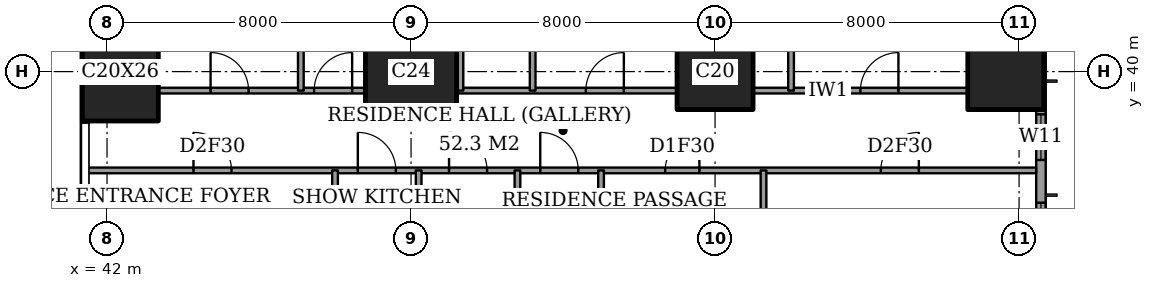
"""IFC4 building model, lengths in metres.
Left out: names, types, materials, properties, quantities, classifications, styles, units other than length and angle.
Written with IfcOpenShell. Run it as: python <this file> out.ifc"""

import sys

from ifc_helpers import new_model, si_unit, direction, frame, frame_2d, origin, origin_2d, place, context, subcontext, project, spatial, rectangle, extrude, element, fill, save


model = new_model("IFC4")
c1 = context("Model", 3, precision=1e-05, world=origin(), true_north=direction((0.0, 1.0)))
c2 = subcontext(c1, "Body", "Model", "MODEL_VIEW")
j1 = project(units=[si_unit("LENGTHUNIT", "METRE"), si_unit("PLANEANGLEUNIT", "RADIAN")], contexts=[c1])
p1 = place(None, origin())
s1 = spatial("IfcSite", under=j1, at=p1, CompositionType="ELEMENT")
p2 = place(p1, origin())
s2 = spatial("IfcBuilding", under=s1, at=p2, CompositionType="ELEMENT")
p3 = place(p2, frame((0.0, 0.0, 121.4)))
s3 = spatial("IfcBuildingStorey", under=s2, at=p3, CompositionType="ELEMENT", Elevation=121.4)
p4 = place(p3, frame((42.35, 40.0, 0.0), z_axis=(0.0, 0.0, 1.0), x_axis=(1.0, 0.0, 0.0)))
e1 = element("IfcColumn", 1, at=p4, inside=s3, PredefinedType="COLUMN", context=c2, shape_type="SweptSolid", body=[
    extrude(rectangle(XDim=2.0, YDim=2.6, at=origin_2d()), origin(), (0.0, 0.0, 1.0), 3.6),
])
p5 = place(p3, frame((50.0, 40.0, 0.0), z_axis=(0.0, 0.0, 1.0), x_axis=(1.0, 0.0, 0.0)))
e2 = element("IfcColumn", 2, at=p5, inside=s3, PredefinedType="COLUMN", context=c2, shape_type="SweptSolid", body=[
    extrude(rectangle(XDim=2.4, YDim=2.4, at=origin_2d()), origin(), (0.0, 0.0, 1.0), 3.6),
])
for number, where, z_axis, x_axis in (
    (3, (58.0, 40.0, 0.0), (0.0, 0.0, 1.0), (1.0, 0.0, 0.0)),
    (4, (65.65, 40.0, 0.0), (0.0, 0.0, 1.0), (1.0, 0.0, 0.0)),
):
    element("IfcColumn", number, at=place(p3, frame(where, z_axis=z_axis, x_axis=x_axis)), inside=s3, PredefinedType="COLUMN", context=c2, shape_type="SweptSolid", body=[
        extrude(rectangle(XDim=2.0, YDim=2.0, at=origin_2d()), origin(), (0.0, 0.0, 1.0), 3.6),
    ])
p6 = place(p3, frame((66.575, 3.175, 0.0), z_axis=(0.0, 0.0, 1.0), x_axis=(0.0, 1.0, 0.0)))
e5 = element("IfcWall", 5, at=p6, inside=s3, PredefinedType="SOLIDWALL", context=c2, shape_type="SweptSolid", body=[
    extrude(rectangle(XDim=41.65, YDim=0.25, at=frame_2d((20.825, 0.0))), origin(), (0.0, 0.0, 1.0), 3.6),
])
p7 = place(p6, frame((0.775, 0.0, 0.4)))
e6 = element("IfcOpeningElement", 6, at=p7, cuts=e5, PredefinedType="OPENING", context=c2, shape_type="SweptSolid", body=[
    extrude(rectangle(XDim=2.4, YDim=2.2, at=frame_2d((1.2, 1.1))), frame((0.0, 0.135, 0.0), z_axis=(0.0, -1.0, 0.0), x_axis=(1.0, 0.0, 0.0)), (0.0, 0.0, 1.0), 0.27),
])
p8 = place(p6, frame((6.4, 0.0, 0.4)))
e7 = element("IfcOpeningElement", 7, at=p8, cuts=e5, PredefinedType="OPENING", context=c2, shape_type="SweptSolid", body=[
    extrude(rectangle(XDim=1.2, YDim=2.2, at=frame_2d((0.6, 1.1))), frame((0.0, 0.135, 0.0), z_axis=(0.0, -1.0, 0.0), x_axis=(1.0, 0.0, 0.0)), (0.0, 0.0, 1.0), 0.27),
])
p9 = place(p6, frame((8.475, 0.0, 0.4)))
e8 = element("IfcOpeningElement", 8, at=p9, cuts=e5, PredefinedType="OPENING", context=c2, shape_type="SweptSolid", body=[
    extrude(rectangle(XDim=2.4, YDim=2.2, at=frame_2d((1.2, 1.1))), frame((0.0, 0.135, 0.0), z_axis=(0.0, -1.0, 0.0), x_axis=(1.0, 0.0, 0.0)), (0.0, 0.0, 1.0), 0.27),
])
p10 = place(p6, frame((15.775, 0.0, 0.4)))
e9 = element("IfcOpeningElement", 9, at=p10, cuts=e5, PredefinedType="OPENING", context=c2, shape_type="SweptSolid", body=[
    extrude(rectangle(XDim=2.4, YDim=2.2, at=frame_2d((1.2, 1.1))), frame((0.0, 0.135, 0.0), z_axis=(0.0, -1.0, 0.0), x_axis=(1.0, 0.0, 0.0)), (0.0, 0.0, 1.0), 0.27),
])
p11 = place(p6, frame((23.475, 0.0, 0.4)))
e10 = element("IfcOpeningElement", 10, at=p11, cuts=e5, PredefinedType="OPENING", context=c2, shape_type="SweptSolid", body=[
    extrude(rectangle(XDim=2.4, YDim=2.2, at=frame_2d((1.2, 1.1))), frame((0.0, 0.135, 0.0), z_axis=(0.0, -1.0, 0.0), x_axis=(1.0, 0.0, 0.0)), (0.0, 0.0, 1.0), 0.27),
])
p12 = place(p6, frame((30.975, 0.0, 0.4)))
e11 = element("IfcOpeningElement", 11, at=p12, cuts=e5, PredefinedType="OPENING", context=c2, shape_type="SweptSolid", body=[
    extrude(rectangle(XDim=2.4, YDim=2.2, at=frame_2d((1.2, 1.1))), frame((0.0, 0.135, 0.0), z_axis=(0.0, -1.0, 0.0), x_axis=(1.0, 0.0, 0.0)), (0.0, 0.0, 1.0), 0.27),
])
p13 = place(p6, frame((34.5, 0.0, 0.4)))
e12 = element("IfcOpeningElement", 12, at=p13, cuts=e5, PredefinedType="OPENING", context=c2, shape_type="SweptSolid", body=[
    extrude(rectangle(XDim=1.2, YDim=2.2, at=frame_2d((0.6, 1.1))), frame((0.0, 0.135, 0.0), z_axis=(0.0, -1.0, 0.0), x_axis=(1.0, 0.0, 0.0)), (0.0, 0.0, 1.0), 0.27),
])
p14 = place(p6, frame((38.475, 0.0, 0.4)))
e13 = element("IfcOpeningElement", 13, at=p14, cuts=e5, PredefinedType="OPENING", context=c2, shape_type="SweptSolid", body=[
    extrude(rectangle(XDim=2.4, YDim=2.2, at=frame_2d((1.2, 1.1))), frame((0.0, 0.135, 0.0), z_axis=(0.0, -1.0, 0.0), x_axis=(1.0, 0.0, 0.0)), (0.0, 0.0, 1.0), 0.27),
])
p15 = place(p3, frame((41.439, 37.4, 0.0), z_axis=(0.0, 0.0, 1.0), x_axis=(1.0, 0.0, 0.0)))
e14 = element("IfcWall", 14, at=p15, inside=s3, PredefinedType="PARTITIONING", context=c2, shape_type="SweptSolid", body=[
    extrude(rectangle(XDim=25.011, YDim=0.15, at=frame_2d((12.505, 0.0))), origin(), (0.0, 0.0, 1.0), 3.35),
])
p16 = place(p15, frame((11.961, 0.0, 0.0)))
e15 = element("IfcOpeningElement", 15, at=p16, cuts=e14, PredefinedType="OPENING", context=c2, shape_type="SweptSolid", body=[
    extrude(rectangle(XDim=1.0, YDim=2.1, at=frame_2d((0.5, 1.05))), frame((0.0, 0.085, 0.0), z_axis=(0.0, -1.0, 0.0), x_axis=(1.0, 0.0, 0.0)), (0.0, 0.0, 1.0), 0.17),
])
p17 = place(p15, frame((20.924, 0.0, 0.0)))
e16 = element("IfcOpeningElement", 16, at=p17, cuts=e14, PredefinedType="OPENING", context=c2, shape_type="SweptSolid", body=[
    extrude(rectangle(XDim=1.0, YDim=2.1, at=frame_2d((0.5, 1.05))), frame((0.0, 0.085, 0.0), z_axis=(0.0, -1.0, 0.0), x_axis=(1.0, 0.0, 0.0)), (0.0, 0.0, 1.0), 0.17),
])
p18 = place(p15, frame((15.249, 0.0, 0.0)))
e17 = element("IfcOpeningElement", 17, at=p18, cuts=e14, PredefinedType="OPENING", context=c2, shape_type="SweptSolid", body=[
    extrude(rectangle(XDim=0.9, YDim=2.1, at=frame_2d((0.45, 1.05))), frame((0.0, 0.085, 0.0), z_axis=(0.0, -1.0, 0.0), x_axis=(1.0, 0.0, 0.0)), (0.0, 0.0, 1.0), 0.17),
])
p19 = place(p15, frame((9.561, 0.0, 0.0)))
e18 = element("IfcOpeningElement", 18, at=p19, cuts=e14, PredefinedType="OPENING", context=c2, shape_type="SweptSolid", body=[
    extrude(rectangle(XDim=1.0, YDim=2.1, at=frame_2d((0.5, 1.05))), frame((0.0, 0.085, 0.0), z_axis=(0.0, -1.0, 0.0), x_axis=(1.0, 0.0, 0.0)), (0.0, 0.0, 1.0), 0.17),
])
p20 = place(p15, frame((7.161, 0.0, 0.0)))
e19 = element("IfcOpeningElement", 19, at=p20, cuts=e14, PredefinedType="OPENING", context=c2, shape_type="SweptSolid", body=[
    extrude(rectangle(XDim=1.0, YDim=2.1, at=frame_2d((0.5, 1.05))), frame((0.0, 0.085, 0.0), z_axis=(0.0, -1.0, 0.0), x_axis=(1.0, 0.0, 0.0)), (0.0, 0.0, 1.0), 0.17),
])
p21 = place(p15, frame((2.836, 0.0, 0.0)))
e20 = element("IfcOpeningElement", 20, at=p21, cuts=e14, PredefinedType="OPENING", context=c2, shape_type="SweptSolid", body=[
    extrude(rectangle(XDim=1.0, YDim=2.1, at=frame_2d((0.5, 1.05))), frame((0.0, 0.085, 0.0), z_axis=(0.0, -1.0, 0.0), x_axis=(1.0, 0.0, 0.0)), (0.0, 0.0, 1.0), 0.17),
])
p22 = place(p3, frame((43.35, 39.5, 0.0), z_axis=(0.0, 0.0, 1.0), x_axis=(1.0, 0.0, 0.0)))
e21 = element("IfcWall", 21, at=p22, inside=s3, PredefinedType="PARTITIONING", context=c2, shape_type="SweptSolid", body=[
    extrude(rectangle(XDim=5.45, YDim=0.15, at=frame_2d((2.725, 0.0))), origin(), (0.0, 0.0, 1.0), 3.35),
])
p23 = place(p22, frame((4.1, 0.0, 0.0)))
e22 = element("IfcOpeningElement", 22, at=p23, cuts=e21, PredefinedType="OPENING", context=c2, shape_type="SweptSolid", body=[
    extrude(rectangle(XDim=1.0, YDim=2.1, at=frame_2d((0.5, 1.05))), frame((0.0, 0.085, 0.0), z_axis=(0.0, -1.0, 0.0), x_axis=(1.0, 0.0, 0.0)), (0.0, 0.0, 1.0), 0.17),
])
p24 = place(p22, frame((1.375, 0.0, 0.0)))
e23 = element("IfcOpeningElement", 23, at=p24, cuts=e21, PredefinedType="OPENING", context=c2, shape_type="SweptSolid", body=[
    extrude(rectangle(XDim=1.0, YDim=2.1, at=frame_2d((0.5, 1.05))), frame((0.0, 0.085, 0.0), z_axis=(0.0, -1.0, 0.0), x_axis=(1.0, 0.0, 0.0)), (0.0, 0.0, 1.0), 0.17),
])
p25 = place(p3, frame((51.2, 39.5, 0.0), z_axis=(0.0, 0.0, 1.0), x_axis=(1.0, 0.0, 0.0)))
e24 = element("IfcWall", 24, at=p25, inside=s3, PredefinedType="PARTITIONING", context=c2, shape_type="SweptSolid", body=[
    extrude(rectangle(XDim=5.8, YDim=0.15, at=frame_2d((2.9, 0.0))), origin(), (0.0, 0.0, 1.0), 3.35),
])
p26 = place(p25, frame((3.4, 0.0, 0.0)))
e25 = element("IfcOpeningElement", 25, at=p26, cuts=e24, PredefinedType="OPENING", context=c2, shape_type="SweptSolid", body=[
    extrude(rectangle(XDim=1.0, YDim=2.1, at=frame_2d((0.5, 1.05))), frame((0.0, 0.085, 0.0), z_axis=(0.0, -1.0, 0.0), x_axis=(1.0, 0.0, 0.0)), (0.0, 0.0, 1.0), 0.17),
])
p27 = place(p3, frame((59.0, 39.5, 0.0), z_axis=(0.0, 0.0, 1.0), x_axis=(1.0, 0.0, 0.0)))
e26 = element("IfcWall", 26, at=p27, inside=s3, PredefinedType="PARTITIONING", context=c2, shape_type="SweptSolid", body=[
    extrude(rectangle(XDim=5.65, YDim=0.15, at=frame_2d((2.825, 0.0))), origin(), (0.0, 0.0, 1.0), 3.35),
])
p28 = place(p27, frame((2.825, 0.0, 0.0)))
e27 = element("IfcOpeningElement", 27, at=p28, cuts=e26, PredefinedType="OPENING", context=c2, shape_type="SweptSolid", body=[
    extrude(rectangle(XDim=1.0, YDim=2.1, at=frame_2d((0.5, 1.05))), frame((0.0, 0.085, 0.0), z_axis=(0.0, -1.0, 0.0), x_axis=(1.0, 0.0, 0.0)), (0.0, 0.0, 1.0), 0.17),
])
p29 = place(p3, frame((47.1, 39.5, 0.0), z_axis=(0.0, 0.0, 1.0), x_axis=(0.0, 1.0, 0.0)))
e28 = element("IfcWall", 28, at=p29, inside=s3, PredefinedType="PARTITIONING", context=c2, shape_type="SweptSolid", body=[
    extrude(rectangle(XDim=8.95, YDim=0.15, at=frame_2d((4.475, 0.0))), origin(), (0.0, 0.0, 1.0), 3.35),
])
p30 = place(p3, frame((48.0, 28.0, 0.0), z_axis=(0.0, 0.0, 1.0), x_axis=(0.0, 1.0, 0.0)))
e29 = element("IfcWall", 29, at=p30, inside=s3, PredefinedType="PARTITIONING", context=c2, shape_type="SweptSolid", body=[
    extrude(rectangle(XDim=9.4, YDim=0.15, at=frame_2d((4.7, 0.0))), origin(), (0.0, 0.0, 1.0), 3.35),
])
p31 = place(p30, frame((0.5, 0.0, 0.0)))
e30 = element("IfcOpeningElement", 30, at=p31, cuts=e29, PredefinedType="OPENING", context=c2, shape_type="SweptSolid", body=[
    extrude(rectangle(XDim=1.0, YDim=2.1, at=frame_2d((0.5, 1.05))), frame((0.0, 0.085, 0.0), z_axis=(0.0, -1.0, 0.0), x_axis=(1.0, 0.0, 0.0)), (0.0, 0.0, 1.0), 0.17),
])
p32 = place(p3, frame((50.2, 33.2, 0.0), z_axis=(0.0, 0.0, 1.0), x_axis=(0.0, 1.0, 0.0)))
e31 = element("IfcWall", 31, at=p32, inside=s3, PredefinedType="PARTITIONING", context=c2, shape_type="SweptSolid", body=[
    extrude(rectangle(XDim=4.2, YDim=0.15, at=frame_2d((2.1, 0.0))), origin(), (0.0, 0.0, 1.0), 3.35),
])
p33 = place(p3, frame((51.3, 39.5, 0.0), z_axis=(0.0, 0.0, 1.0), x_axis=(0.0, 1.0, 0.0)))
e32 = element("IfcWall", 32, at=p33, inside=s3, PredefinedType="PARTITIONING", context=c2, shape_type="SweptSolid", body=[
    extrude(rectangle(XDim=8.95, YDim=0.15, at=frame_2d((4.475, 0.0))), origin(), (0.0, 0.0, 1.0), 3.35),
])
p34 = place(p33, frame((4.025, 0.0, 0.0)))
e33 = element("IfcOpeningElement", 33, at=p34, cuts=e32, PredefinedType="OPENING", context=c2, shape_type="SweptSolid", body=[
    extrude(rectangle(XDim=0.9, YDim=2.1, at=frame_2d((0.45, 1.05))), frame((0.0, 0.085, 0.0), z_axis=(0.0, -1.0, 0.0), x_axis=(1.0, 0.0, 0.0)), (0.0, 0.0, 1.0), 0.17),
])
p35 = place(p3, frame((52.8, 30.0, 0.0), z_axis=(0.0, 0.0, 1.0), x_axis=(0.0, 1.0, 0.0)))
e34 = element("IfcWall", 34, at=p35, inside=s3, PredefinedType="PARTITIONING", context=c2, shape_type="SweptSolid", body=[
    extrude(rectangle(XDim=7.4, YDim=0.15, at=frame_2d((3.7, 0.0))), origin(), (0.0, 0.0, 1.0), 3.35),
])
p36 = place(p3, frame((53.2, 39.5, 0.0), z_axis=(0.0, 0.0, 1.0), x_axis=(0.0, 1.0, 0.0)))
e35 = element("IfcWall", 35, at=p36, inside=s3, PredefinedType="PARTITIONING", context=c2, shape_type="SweptSolid", body=[
    extrude(rectangle(XDim=8.95, YDim=0.15, at=frame_2d((4.475, 0.0))), origin(), (0.0, 0.0, 1.0), 3.35),
])
p37 = place(p3, frame((55.0, 28.0, 0.0), z_axis=(0.0, 0.0, 1.0), x_axis=(0.0, 1.0, 0.0)))
e36 = element("IfcWall", 36, at=p37, inside=s3, PredefinedType="PARTITIONING", context=c2, shape_type="SweptSolid", body=[
    extrude(rectangle(XDim=9.4, YDim=0.15, at=frame_2d((4.7, 0.0))), origin(), (0.0, 0.0, 1.0), 3.35),
])
p38 = place(p37, frame((0.5, 0.0, 0.0)))
e37 = element("IfcOpeningElement", 37, at=p38, cuts=e36, PredefinedType="OPENING", context=c2, shape_type="SweptSolid", body=[
    extrude(rectangle(XDim=1.0, YDim=2.1, at=frame_2d((0.5, 1.05))), frame((0.0, 0.085, 0.0), z_axis=(0.0, -1.0, 0.0), x_axis=(1.0, 0.0, 0.0)), (0.0, 0.0, 1.0), 0.17),
])
p39 = place(p3, frame((59.275, 33.2, 0.0), z_axis=(0.0, 0.0, 1.0), x_axis=(0.0, 1.0, 0.0)))
e38 = element("IfcWall", 38, at=p39, inside=s3, PredefinedType="PARTITIONING", context=c2, shape_type="SweptSolid", body=[
    extrude(rectangle(XDim=4.2, YDim=0.15, at=frame_2d((2.1, 0.0))), origin(), (0.0, 0.0, 1.0), 3.35),
])
p40 = place(p3, frame((60.0, 39.5, 0.0), z_axis=(0.0, 0.0, 1.0), x_axis=(0.0, 1.0, 0.0)))
e39 = element("IfcWall", 39, at=p40, inside=s3, PredefinedType="PARTITIONING", context=c2, shape_type="SweptSolid", body=[
    extrude(rectangle(XDim=8.95, YDim=0.15, at=frame_2d((4.475, 0.0))), origin(), (0.0, 0.0, 1.0), 3.35),
])
p41 = place(p12, origin())
e40 = element("IfcWindow", 40, at=p41, inside=s3, PartitioningType="SINGLE_PANEL", PredefinedType="WINDOW", context=c2, shape_type="SweptSolid", body=[
    extrude(rectangle(XDim=2.4, YDim=2.2, at=frame_2d((1.2, 1.1))), frame((0.0, 0.03, 0.0), z_axis=(0.0, -1.0, 0.0), x_axis=(1.0, 0.0, 0.0)), (0.0, 0.0, 1.0), 0.06),
])
fill(e11, e40)
p42 = place(p13, origin())
e41 = element("IfcWindow", 41, at=p42, inside=s3, PartitioningType="SINGLE_PANEL", PredefinedType="WINDOW", context=c2, shape_type="SweptSolid", body=[
    extrude(rectangle(XDim=1.2, YDim=2.2, at=frame_2d((0.6, 1.1))), frame((0.0, 0.03, 0.0), z_axis=(0.0, -1.0, 0.0), x_axis=(1.0, 0.0, 0.0)), (0.0, 0.0, 1.0), 0.06),
])
fill(e12, e41)
p43 = place(p28, origin())
e42 = element("IfcDoor", 42, at=p43, inside=s3, OperationType="SINGLE_SWING_LEFT", PredefinedType="DOOR", context=c2, shape_type="SweptSolid", body=[
    extrude(rectangle(XDim=1.0, YDim=2.1, at=frame_2d((0.5, 1.05))), frame((0.0, 0.025, 0.0), z_axis=(0.0, -1.0, 0.0), x_axis=(1.0, 0.0, 0.0)), (0.0, 0.0, 1.0), 0.05),
])
fill(e27, e42)
p44 = place(p26, origin())
e43 = element("IfcDoor", 43, at=p44, inside=s3, OperationType="SINGLE_SWING_LEFT", PredefinedType="DOOR", context=c2, shape_type="SweptSolid", body=[
    extrude(rectangle(XDim=1.0, YDim=2.1, at=frame_2d((0.5, 1.05))), frame((0.0, 0.025, 0.0), z_axis=(0.0, -1.0, 0.0), x_axis=(1.0, 0.0, 0.0)), (0.0, 0.0, 1.0), 0.05),
])
fill(e25, e43)
p45 = place(p23, origin())
e44 = element("IfcDoor", 44, at=p45, inside=s3, OperationType="SINGLE_SWING_LEFT", PredefinedType="DOOR", context=c2, shape_type="SweptSolid", body=[
    extrude(rectangle(XDim=1.0, YDim=2.1, at=frame_2d((0.5, 1.05))), frame((0.0, 0.025, 0.0), z_axis=(0.0, -1.0, 0.0), x_axis=(1.0, 0.0, 0.0)), (0.0, 0.0, 1.0), 0.05),
])
fill(e22, e44)
p46 = place(p24, origin())
e45 = element("IfcDoor", 45, at=p46, inside=s3, OperationType="SINGLE_SWING_RIGHT", PredefinedType="DOOR", context=c2, shape_type="SweptSolid", body=[
    extrude(rectangle(XDim=1.0, YDim=2.1, at=frame_2d((0.5, 1.05))), frame((0.0, 0.025, 0.0), z_axis=(0.0, -1.0, 0.0), x_axis=(1.0, 0.0, 0.0)), (0.0, 0.0, 1.0), 0.05),
])
fill(e23, e45)
p47 = place(p16, origin())
e46 = element("IfcDoor", 46, at=p47, inside=s3, OperationType="SINGLE_SWING_RIGHT", PredefinedType="DOOR", context=c2, shape_type="SweptSolid", body=[
    extrude(rectangle(XDim=1.0, YDim=2.1, at=frame_2d((0.5, 1.05))), frame((0.0, 0.025, 0.0), z_axis=(0.0, -1.0, 0.0), x_axis=(1.0, 0.0, 0.0)), (0.0, 0.0, 1.0), 0.05),
])
fill(e15, e46)
p48 = place(p17, origin())
e47 = element("IfcDoor", 47, at=p48, inside=s3, OperationType="SINGLE_SWING_LEFT", PredefinedType="DOOR", context=c2, shape_type="SweptSolid", body=[
    extrude(rectangle(XDim=1.0, YDim=2.1, at=frame_2d((0.5, 1.05))), frame((0.0, 0.025, 0.0), z_axis=(0.0, -1.0, 0.0), x_axis=(1.0, 0.0, 0.0)), (0.0, 0.0, 1.0), 0.05),
])
fill(e16, e47)
p49 = place(p18, origin())
e48 = element("IfcDoor", 48, at=p49, inside=s3, OperationType="SINGLE_SWING_LEFT", PredefinedType="DOOR", context=c2, shape_type="SweptSolid", body=[
    extrude(rectangle(XDim=0.9, YDim=2.1, at=frame_2d((0.45, 1.05))), frame((0.0, 0.025, 0.0), z_axis=(0.0, -1.0, 0.0), x_axis=(1.0, 0.0, 0.0)), (0.0, 0.0, 1.0), 0.05),
])
fill(e17, e48)
p50 = place(p19, origin())
e49 = element("IfcDoor", 49, at=p50, inside=s3, OperationType="SINGLE_SWING_RIGHT", PredefinedType="DOOR", context=c2, shape_type="SweptSolid", body=[
    extrude(rectangle(XDim=1.0, YDim=2.1, at=frame_2d((0.5, 1.05))), frame((0.0, 0.025, 0.0), z_axis=(0.0, -1.0, 0.0), x_axis=(1.0, 0.0, 0.0)), (0.0, 0.0, 1.0), 0.05),
])
fill(e18, e49)
p51 = place(p20, origin())
e50 = element("IfcDoor", 50, at=p51, inside=s3, OperationType="SINGLE_SWING_RIGHT", PredefinedType="DOOR", context=c2, shape_type="SweptSolid", body=[
    extrude(rectangle(XDim=1.0, YDim=2.1, at=frame_2d((0.5, 1.05))), frame((0.0, 0.025, 0.0), z_axis=(0.0, -1.0, 0.0), x_axis=(1.0, 0.0, 0.0)), (0.0, 0.0, 1.0), 0.05),
])
fill(e19, e50)
p52 = place(p21, origin())
e51 = element("IfcDoor", 51, at=p52, inside=s3, OperationType="SINGLE_SWING_RIGHT", PredefinedType="DOOR", context=c2, shape_type="SweptSolid", body=[
    extrude(rectangle(XDim=1.0, YDim=2.1, at=frame_2d((0.5, 1.05))), frame((0.0, 0.025, 0.0), z_axis=(0.0, -1.0, 0.0), x_axis=(1.0, 0.0, 0.0)), (0.0, 0.0, 1.0), 0.05),
])
fill(e20, e51)
save(model, sys.argv[1])
